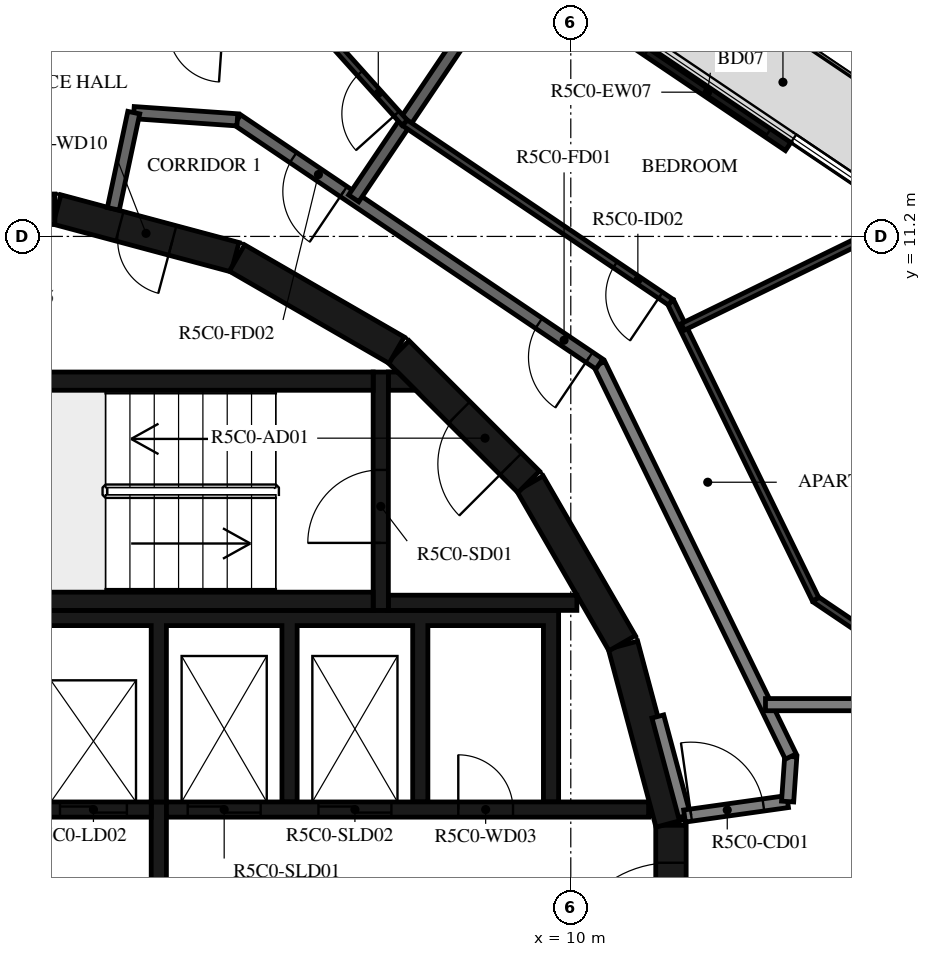
"""IFC4 building model, lengths in metres.
Left out: names, types, materials, properties, quantities, classifications, styles, units other than length and angle.
Written with IfcOpenShell. Run it as: python <this file> out.ifc"""

import sys

from ifc_helpers import new_model, si_unit, direction, frame, frame_2d, origin, place, context, subcontext, project, spatial, polyline, rectangle, outline, extrude, element, fill, save


model = new_model("IFC4")
c1 = context("Model", 3, precision=1e-05, world=origin(), true_north=direction((0.0, 1.0)))
c2 = subcontext(c1, "Body", "Model", "MODEL_VIEW")
j1 = project(units=[si_unit("LENGTHUNIT", "METRE"), si_unit("PLANEANGLEUNIT", "RADIAN")], contexts=[c1])
p1 = place(None, origin())
s1 = spatial("IfcSite", under=j1, at=p1, CompositionType="ELEMENT")
p2 = place(p1, origin())
s2 = spatial("IfcBuilding", under=s1, at=p2, CompositionType="ELEMENT")
p3 = place(p2, frame((0.0, 0.0, 216.4)))
s3 = spatial("IfcBuildingStorey", under=s2, at=p3, CompositionType="ELEMENT", Elevation=216.4)
p4 = place(p3, frame((13.574, 12.677, 0.0), z_axis=(0.0, 0.0, 1.0), x_axis=(-0.829068838882, 0.55914654644, 0.0)))
e1 = element("IfcWall", 1, at=p4, inside=s3, PredefinedType="STANDARD", context=c2, shape_type="SweptSolid", body=[
    extrude(rectangle(XDim=3.2, YDim=0.16, at=frame_2d((1.6, 0.0))), origin(), (0.0, 0.0, 1.0), 3.05),
])
p5 = place(p4, frame((0.4, 0.0, 0.0)))
e2 = element("IfcOpeningElement", 2, at=p5, cuts=e1, PredefinedType="OPENING", context=c2, shape_type="SweptSolid", body=[
    extrude(rectangle(XDim=2.4, YDim=2.4, at=frame_2d((1.2, 1.2))), frame((0.0, 0.09, 0.0), z_axis=(0.0, -1.0, 0.0), x_axis=(1.0, 0.0, 0.0)), (0.0, 0.0, 1.0), 0.18),
])
p6 = place(p3, frame((11.647, -1.516, 0.0), z_axis=(0.0, 0.0, 1.0), x_axis=(0.0, 1.0, 0.0)))
e3 = element("IfcWall", 3, at=p6, inside=s3, PredefinedType="SHEAR", context=c2, shape_type="SweptSolid", body=[
    extrude(rectangle(XDim=3.033, YDim=0.5, at=frame_2d((1.516, 0.0))), origin(), (0.0, 0.0, 1.0), 3.05),
])
p7 = place(p6, frame((0.616, 0.0, 0.0)))
e4 = element("IfcOpeningElement", 4, at=p7, cuts=e3, PredefinedType="OPENING", context=c2, shape_type="SweptSolid", body=[
    extrude(rectangle(XDim=1.8, YDim=2.1, at=frame_2d((0.9, 1.05))), frame((0.0, 0.26, 0.0), z_axis=(0.0, -1.0, 0.0), x_axis=(1.0, 0.0, 0.0)), (0.0, 0.0, 1.0), 0.52),
])
for number, where, z_axis, x_axis in (
    (5, (11.643, 1.55, 0.0), (0.0, 0.0, 1.0), (-0.259, 0.966, 0.0)),
    (6, (10.845, 4.51, 0.0), (0.0, 0.0, 1.0), (-0.5, 0.866, 0.0)),
):
    element("IfcWall", number, at=place(p3, frame(where, z_axis=z_axis, x_axis=x_axis)), inside=s3, PredefinedType="SHEAR", context=c2, shape_type="SweptSolid", body=[
        extrude(rectangle(XDim=3.033, YDim=0.5, at=frame_2d((1.516, 0.0))), origin(), (0.0, 0.0, 1.0), 3.05),
    ])
p8 = place(p3, frame((9.308, 7.164, 0.0), z_axis=(0.0, 0.0, 1.0), x_axis=(-0.707106781187, 0.707106781187, 0.0)))
e7 = element("IfcWall", 7, at=p8, inside=s3, PredefinedType="SHEAR", context=c2, shape_type="SweptSolid", body=[
    extrude(rectangle(XDim=3.032, YDim=0.5, at=frame_2d((1.516, 0.0))), origin(), (0.0, 0.0, 1.0), 3.05),
])
p9 = place(p8, frame((0.416, 0.0, 0.0)))
e8 = element("IfcOpeningElement", 8, at=p9, cuts=e7, PredefinedType="OPENING", context=c2, shape_type="SweptSolid", body=[
    extrude(rectangle(XDim=1.2, YDim=2.1, at=frame_2d((0.6, 1.05))), frame((0.0, 0.26, 0.0), z_axis=(0.0, -1.0, 0.0), x_axis=(1.0, 0.0, 0.0)), (0.0, 0.0, 1.0), 0.52),
])
p10 = place(p3, frame((7.137, 9.329, 0.0), z_axis=(0.0, 0.0, 1.0), x_axis=(-0.865975092491, 0.500087131594, 0.0)))
e9 = element("IfcWall", 9, at=p10, inside=s3, PredefinedType="SHEAR", context=c2, shape_type="SweptSolid", body=[
    extrude(rectangle(XDim=3.033, YDim=0.5, at=frame_2d((1.516, 0.0))), origin(), (0.0, 0.0, 1.0), 3.05),
])
p11 = place(p3, frame((4.479, 10.858, 0.0), z_axis=(0.0, 0.0, 1.0), x_axis=(-0.965948410781, 0.258734743916, 0.0)))
e10 = element("IfcWall", 10, at=p11, inside=s3, PredefinedType="SHEAR", context=c2, shape_type="SweptSolid", body=[
    extrude(rectangle(XDim=3.033, YDim=0.5, at=frame_2d((1.516, 0.0))), origin(), (0.0, 0.0, 1.0), 3.05),
])
p12 = place(p11, frame((1.066, 0.0, 0.0)))
e11 = element("IfcOpeningElement", 11, at=p12, cuts=e10, PredefinedType="OPENING", context=c2, shape_type="SweptSolid", body=[
    extrude(rectangle(XDim=0.9, YDim=2.1, at=frame_2d((0.45, 1.05))), frame((0.0, 0.26, 0.0), z_axis=(0.0, -1.0, 0.0), x_axis=(1.0, 0.0, 0.0)), (0.0, 0.0, 1.0), 0.52),
])
p13 = place(p3, frame((1.516, 11.647, 0.0), z_axis=(0.0, 0.0, 1.0), x_axis=(-1.0, 0.0, 0.0)))
e12 = element("IfcWall", 12, at=p13, inside=s3, PredefinedType="SHEAR", context=c2, shape_type="SweptSolid", body=[
    extrude(rectangle(XDim=3.033, YDim=0.5, at=frame_2d((1.516, 0.0))), origin(), (0.0, 0.0, 1.0), 3.05),
])
for number, where, z_axis, x_axis in (
    (13, (0.0, 5.2, 0.0), (0.0, 0.0, 1.0), (1.0, 0.0, 0.0)),
    (14, (0.0, 8.82, 0.0), (0.0, 0.0, 1.0), (1.0, 0.0, 0.0)),
):
    element("IfcWall", number, at=place(p3, frame(where, z_axis=z_axis, x_axis=x_axis)), inside=s3, PredefinedType="SHEAR", context=c2, shape_type="SweptSolid", body=[
        extrude(rectangle(XDim=6.75, YDim=0.3, at=frame_2d((3.375, 0.0))), origin(), (0.0, 0.0, 1.0), 3.05),
    ])
p14 = place(p3, frame((6.875, 5.05, 0.0), z_axis=(0.0, 0.0, 1.0), x_axis=(0.0, 1.0, 0.0)))
e15 = element("IfcWall", 15, at=p14, inside=s3, PredefinedType="SHEAR", context=c2, shape_type="SweptSolid", body=[
    extrude(rectangle(XDim=3.92, YDim=0.25, at=frame_2d((1.96, 0.0))), origin(), (0.0, 0.0, 1.0), 3.05),
])
p15 = place(p14, frame((1.11, 0.0, 0.0)))
e16 = element("IfcOpeningElement", 16, at=p15, cuts=e15, PredefinedType="OPENING", context=c2, shape_type="SweptSolid", body=[
    extrude(rectangle(XDim=1.2, YDim=2.1, at=frame_2d((0.6, 1.05))), frame((0.0, 0.135, 0.0), z_axis=(0.0, -1.0, 0.0), x_axis=(1.0, 0.0, 0.0)), (0.0, 0.0, 1.0), 0.27),
])
p16 = place(p3, frame((7.0, 5.175, 0.0), z_axis=(0.0, 0.0, 1.0), x_axis=(1.0, 0.0, 0.0)))
e17 = element("IfcWall", 17, at=p16, inside=s3, PredefinedType="SHEAR", context=c2, shape_type="SweptSolid", body=[
    extrude(rectangle(XDim=3.1, YDim=0.25, at=frame_2d((1.55, 0.0))), origin(), (0.0, 0.0, 1.0), 3.05),
])
p17 = place(p3, origin())
e18 = element("IfcWall", 18, at=p17, inside=s3, PredefinedType="SHEAR", context=c2, shape_type="SweptSolid", body=[
    extrude(outline(polyline([(7.448, 8.67), (7.0, 8.67), (7.0, 8.97), (7.148, 8.97), (7.448, 8.67)])), origin(), (0.0, 0.0, 1.0), 3.05),
])
p18 = place(p3, origin())
e19 = element("IfcWall", 19, at=p18, inside=s3, PredefinedType="SHEAR", context=c2, shape_type="SweptSolid", body=[
    extrude(outline(polyline([(-9.55, 4.8), (-5.5, 4.8), (-5.5, 1.9), (-5.25, 1.9), (-5.25, 4.8), (-1.2, 4.8), (-1.2, 1.9), (-0.95, 1.9), (-0.95, 4.8), (0.95, 4.8), (0.95, 1.9), (1.2, 1.9), (1.2, 4.8), (3.1, 4.8), (3.1, 1.9), (3.35, 1.9), (3.35, 4.8), (5.25, 4.8), (5.25, 1.9), (5.5, 1.9), (5.5, 4.8), (7.4, 4.8), (7.4, 1.9), (7.65, 1.9), (7.65, 4.8), (9.55, 4.8), (9.55, 1.9), (9.8, 1.9), (9.8, 4.8), (9.8, 5.05), (-9.8, 5.05), (-9.8, 4.8), (-9.8, 1.9), (-9.55, 1.9), (-9.55, 4.8)])), origin(), (0.0, 0.0, 1.0), 3.05),
])
p19 = place(p3, frame((-11.28, 1.775, 0.0), z_axis=(0.0, 0.0, 1.0), x_axis=(1.0, 0.0, 0.0)))
e20 = element("IfcWall", 20, at=p19, inside=s3, PredefinedType="SHEAR", context=c2, shape_type="SweptSolid", body=[
    extrude(rectangle(XDim=14.38, YDim=0.25, at=frame_2d((7.19, 0.0))), origin(), (0.0, 0.0, 1.0), 3.05),
])
p20 = place(p19, frame((10.73, 0.0, 0.0)))
e21 = element("IfcOpeningElement", 21, at=p20, cuts=e20, PredefinedType="OPENING", context=c2, shape_type="SweptSolid", body=[
    extrude(rectangle(XDim=1.1, YDim=2.1, at=frame_2d((0.55, 1.05))), frame((0.0, 0.135, 0.0), z_axis=(0.0, -1.0, 0.0), x_axis=(1.0, 0.0, 0.0)), (0.0, 0.0, 1.0), 0.27),
])
p21 = place(p19, frame((12.88, 0.0, 0.0)))
e22 = element("IfcOpeningElement", 22, at=p21, cuts=e20, PredefinedType="OPENING", context=c2, shape_type="SweptSolid", body=[
    extrude(rectangle(XDim=1.1, YDim=2.1, at=frame_2d((0.55, 1.05))), frame((0.0, 0.135, 0.0), z_axis=(0.0, -1.0, 0.0), x_axis=(1.0, 0.0, 0.0)), (0.0, 0.0, 1.0), 0.27),
])
p22 = place(p19, frame((3.305, 0.0, 0.0)))
e23 = element("IfcOpeningElement", 23, at=p22, cuts=e20, PredefinedType="OPENING", context=c2, shape_type="SweptSolid", body=[
    extrude(rectangle(XDim=0.9, YDim=2.1, at=frame_2d((0.45, 1.05))), frame((0.0, 0.135, 0.0), z_axis=(0.0, -1.0, 0.0), x_axis=(1.0, 0.0, 0.0)), (0.0, 0.0, 1.0), 0.27),
])
p23 = place(p19, frame((7.605, 0.0, 0.0)))
e24 = element("IfcOpeningElement", 24, at=p23, cuts=e20, PredefinedType="OPENING", context=c2, shape_type="SweptSolid", body=[
    extrude(rectangle(XDim=0.9, YDim=2.1, at=frame_2d((0.45, 1.05))), frame((0.0, 0.135, 0.0), z_axis=(0.0, -1.0, 0.0), x_axis=(1.0, 0.0, 0.0)), (0.0, 0.0, 1.0), 0.27),
])
p24 = place(p3, frame((3.35, 1.775, 0.0), z_axis=(0.0, 0.0, 1.0), x_axis=(1.0, 0.0, 0.0)))
e25 = element("IfcWall", 25, at=p24, inside=s3, PredefinedType="SHEAR", context=c2, shape_type="SweptSolid", body=[
    extrude(rectangle(XDim=7.93, YDim=0.25, at=frame_2d((3.965, 0.0))), origin(), (0.0, 0.0, 1.0), 3.05),
])
p25 = place(p24, frame((0.35, 0.0, 0.0)))
e26 = element("IfcOpeningElement", 26, at=p25, cuts=e25, PredefinedType="OPENING", context=c2, shape_type="SweptSolid", body=[
    extrude(rectangle(XDim=1.2, YDim=2.4, at=frame_2d((0.6, 1.2))), frame((0.0, 0.135, 0.0), z_axis=(0.0, -1.0, 0.0), x_axis=(1.0, 0.0, 0.0)), (0.0, 0.0, 1.0), 0.27),
])
p26 = place(p24, frame((2.5, 0.0, 0.0)))
e27 = element("IfcOpeningElement", 27, at=p26, cuts=e25, PredefinedType="OPENING", context=c2, shape_type="SweptSolid", body=[
    extrude(rectangle(XDim=1.2, YDim=2.4, at=frame_2d((0.6, 1.2))), frame((0.0, 0.135, 0.0), z_axis=(0.0, -1.0, 0.0), x_axis=(1.0, 0.0, 0.0)), (0.0, 0.0, 1.0), 0.27),
])
p27 = place(p24, frame((4.8, 0.0, 0.0)))
e28 = element("IfcOpeningElement", 28, at=p27, cuts=e25, PredefinedType="OPENING", context=c2, shape_type="SweptSolid", body=[
    extrude(rectangle(XDim=0.9, YDim=2.1, at=frame_2d((0.45, 1.05))), frame((0.0, 0.135, 0.0), z_axis=(0.0, -1.0, 0.0), x_axis=(1.0, 0.0, 0.0)), (0.0, 0.0, 1.0), 0.27),
])
p28 = place(p3, frame((3.225, -1.9, 0.0), z_axis=(0.0, 0.0, 1.0), x_axis=(0.0, 1.0, 0.0)))
e29 = element("IfcWall", 29, at=p28, inside=s3, PredefinedType="SHEAR", context=c2, shape_type="SweptSolid", body=[
    extrude(rectangle(XDim=3.8, YDim=0.25, at=frame_2d((1.9, 0.0))), origin(), (0.0, 0.0, 1.0), 3.05),
])
p29 = place(p3, frame((11.87, 1.668, 0.0), z_axis=(0.0, 0.0, 1.0), x_axis=(-0.258836880648, 0.965921047093, 0.0)))
e30 = element("IfcWall", 30, at=p29, inside=s3, PredefinedType="STANDARD", context=c2, shape_type="SweptSolid", body=[
    extrude(rectangle(XDim=1.695, YDim=0.2, at=frame_2d((0.848, 0.0))), origin(), (0.0, 0.0, 1.0), 3.05),
])
p30 = place(p3, frame((11.87, 1.668, 0.0), z_axis=(0.0, 0.0, 1.0), x_axis=(0.990271931984, 0.139145609792, 0.0)))
e31 = element("IfcWall", 31, at=p30, inside=s3, PredefinedType="STANDARD", context=c2, shape_type="SweptSolid", body=[
    extrude(rectangle(XDim=1.712, YDim=0.2, at=frame_2d((0.856, 0.0))), origin(), (0.0, 0.0, 1.0), 3.05),
])
p31 = place(p30, frame((0.11, 0.0, 0.0)))
e32 = element("IfcOpeningElement", 32, at=p31, cuts=e31, PredefinedType="OPENING", context=c2, shape_type="SweptSolid", body=[
    extrude(rectangle(XDim=1.2, YDim=2.1, at=frame_2d((0.6, 1.05))), frame((0.0, 0.11, 0.0), z_axis=(0.0, -1.0, 0.0), x_axis=(1.0, 0.0, 0.0)), (0.0, 0.0, 1.0), 0.22),
])
p32 = place(p3, frame((13.566, 1.906, 0.0), z_axis=(0.0, 0.0, 1.0), x_axis=(0.07005495793, 0.997543133338, 0.0)))
e33 = element("IfcWall", 33, at=p32, inside=s3, PredefinedType="STANDARD", context=c2, shape_type="SweptSolid", body=[
    extrude(rectangle(XDim=0.742, YDim=0.2, at=frame_2d((0.371, 0.0))), origin(), (0.0, 0.0, 1.0), 3.05),
])
p33 = place(p3, frame((13.618, 2.647, 0.0), z_axis=(0.0, 0.0, 1.0), x_axis=(-0.438366026218, 0.898796543751, 0.0)))
e34 = element("IfcWall", 34, at=p33, inside=s3, PredefinedType="STANDARD", context=c2, shape_type="SweptSolid", body=[
    extrude(rectangle(XDim=7.181, YDim=0.2, at=frame_2d((3.591, 0.0))), origin(), (0.0, 0.0, 1.0), 3.05),
])
p34 = place(p3, frame((10.47, 9.101, 0.0), z_axis=(0.0, 0.0, 1.0), x_axis=(-0.829035841718, 0.559195469534, 0.0)))
e35 = element("IfcWall", 35, at=p34, inside=s3, PredefinedType="STANDARD", context=c2, shape_type="SweptSolid", body=[
    extrude(rectangle(XDim=7.181, YDim=0.2, at=frame_2d((3.591, 0.0))), origin(), (0.0, 0.0, 1.0), 3.05),
])
p35 = place(p34, frame((0.2, 0.0, 0.0)))
e36 = element("IfcOpeningElement", 36, at=p35, cuts=e35, PredefinedType="OPENING", context=c2, shape_type="SweptSolid", body=[
    extrude(rectangle(XDim=1.0, YDim=2.1, at=frame_2d((0.5, 1.05))), frame((0.0, 0.11, 0.0), z_axis=(0.0, -1.0, 0.0), x_axis=(1.0, 0.0, 0.0)), (0.0, 0.0, 1.0), 0.22),
])
p36 = place(p34, frame((5.073, 0.0, 0.0)))
e37 = element("IfcOpeningElement", 37, at=p36, cuts=e35, PredefinedType="OPENING", context=c2, shape_type="SweptSolid", body=[
    extrude(rectangle(XDim=1.0, YDim=2.1, at=frame_2d((0.5, 1.05))), frame((0.0, 0.11, 0.0), z_axis=(0.0, -1.0, 0.0), x_axis=(1.0, 0.0, 0.0)), (0.0, 0.0, 1.0), 0.22),
])
p37 = place(p3, frame((4.517, 13.117, 0.0), z_axis=(0.0, 0.0, 1.0), x_axis=(-0.997562153664, 0.069783591025, 0.0)))
e38 = element("IfcWall", 38, at=p37, inside=s3, PredefinedType="STANDARD", context=c2, shape_type="SweptSolid", body=[
    extrude(rectangle(XDim=1.707, YDim=0.2, at=frame_2d((0.854, 0.0))), origin(), (0.0, 0.0, 1.0), 3.05),
])
p38 = place(p3, frame((2.813, 13.236, 0.0), z_axis=(0.0, 0.0, 1.0), x_axis=(-0.207911086063, -0.978147729278, 0.0)))
e39 = element("IfcWall", 39, at=p38, inside=s3, PredefinedType="STANDARD", context=c2, shape_type="SweptSolid", body=[
    extrude(rectangle(XDim=1.618, YDim=0.2, at=frame_2d((0.809, 0.0))), origin(), (0.0, 0.0, 1.0), 3.05),
])
p39 = place(p3, frame((17.9, 3.5, 0.0), z_axis=(0.0, 0.0, 1.0), x_axis=(-1.0, 0.0, 0.0)))
e40 = element("IfcWall", 40, at=p39, inside=s3, PredefinedType="STANDARD", context=c2, shape_type="SweptSolid", body=[
    extrude(rectangle(XDim=4.698, YDim=0.2, at=frame_2d((2.349, 0.0))), origin(), (0.0, 0.0, 1.0), 3.05),
])
p40 = place(p3, frame((9.104, 15.79, 0.0), z_axis=(0.0, 0.0, 1.0), x_axis=(-0.559193912135, -0.829036892201, 0.0)))
e41 = element("IfcWall", 41, at=p40, inside=s3, PredefinedType="STANDARD", context=c2, shape_type="SweptSolid", body=[
    extrude(rectangle(XDim=4.781, YDim=0.2, at=frame_2d((2.39, 0.0))), origin(), (0.0, 0.0, 1.0), 3.05),
])
p41 = place(p3, frame((14.654, 4.808, 0.0), z_axis=(0.0, 0.0, 1.0), x_axis=(-0.829065184024, 0.559151965604, 0.0)))
e42 = element("IfcWall", 42, at=p41, inside=s3, PredefinedType="PARTITIONING", context=c2, shape_type="SweptSolid", body=[
    extrude(rectangle(XDim=0.758, YDim=0.12, at=frame_2d((0.379, 0.0))), origin(), (0.0, 0.0, 1.0), 3.05),
])
p42 = place(p3, frame((14.026, 5.232, 0.0), z_axis=(0.0, 0.0, 1.0), x_axis=(-0.438374985284, 0.89879217413, 0.0)))
e43 = element("IfcWall", 43, at=p42, inside=s3, PredefinedType="PARTITIONING", context=c2, shape_type="SweptSolid", body=[
    extrude(rectangle(XDim=5.438, YDim=0.12, at=frame_2d((2.719, 0.0))), origin(), (0.0, 0.0, 1.0), 3.05),
])
p43 = place(p3, frame((11.642, 10.12, 0.0), z_axis=(0.0, 0.0, 1.0), x_axis=(-0.829054664054, 0.559167563446, 0.0)))
e44 = element("IfcWall", 44, at=p43, inside=s3, PredefinedType="PARTITIONING", context=c2, shape_type="SweptSolid", body=[
    extrude(rectangle(XDim=5.275, YDim=0.12, at=frame_2d((2.637, 0.0))), origin(), (0.0, 0.0, 1.0), 3.05),
])
p44 = place(p43, frame((0.2, 0.0, 0.0)))
e45 = element("IfcOpeningElement", 45, at=p44, cuts=e44, PredefinedType="OPENING", context=c2, shape_type="SweptSolid", body=[
    extrude(rectangle(XDim=0.9, YDim=2.1, at=frame_2d((0.45, 1.05))), frame((0.0, 0.07, 0.0), z_axis=(0.0, -1.0, 0.0), x_axis=(1.0, 0.0, 0.0)), (0.0, 0.0, 1.0), 0.14),
])
p45 = place(p3, frame((15.482, 11.487, 0.0), z_axis=(0.0, 0.0, 1.0), x_axis=(-0.898807251285, -0.438344071521, 0.0)))
e46 = element("IfcWall", 46, at=p45, inside=s3, PredefinedType="PARTITIONING", context=c2, shape_type="SweptSolid", body=[
    extrude(rectangle(XDim=4.051, YDim=0.12, at=frame_2d((2.025, 0.0))), origin(), (0.0, 0.0, 1.0), 3.05),
])
p46 = place(p3, frame((7.269, 13.07, 0.0), z_axis=(0.0, 0.0, 1.0), x_axis=(-0.668495993587, 0.743715743116, 0.0)))
e47 = element("IfcWall", 47, at=p46, inside=s3, PredefinedType="PARTITIONING", context=c2, shape_type="SweptSolid", body=[
    extrude(rectangle(XDim=3.281, YDim=0.12, at=frame_2d((1.641, 0.0))), origin(), (0.0, 0.0, 1.0), 3.05),
])
p47 = place(p46, frame((0.2, 0.0, 0.0)))
e48 = element("IfcOpeningElement", 48, at=p47, cuts=e47, PredefinedType="OPENING", context=c2, shape_type="SweptSolid", body=[
    extrude(rectangle(XDim=0.9, YDim=2.1, at=frame_2d((0.45, 1.05))), frame((0.0, 0.07, 0.0), z_axis=(0.0, -1.0, 0.0), x_axis=(1.0, 0.0, 0.0)), (0.0, 0.0, 1.0), 0.14),
])
p48 = place(p5, origin())
e49 = element("IfcDoor", 49, at=p48, inside=s3, OperationType="DOUBLE_DOOR_SLIDING", PredefinedType="DOOR", context=c2, shape_type="SweptSolid", body=[
    extrude(rectangle(XDim=2.4, YDim=2.4, at=frame_2d((1.2, 1.2))), frame((0.0, 0.025, 0.0), z_axis=(0.0, -1.0, 0.0), x_axis=(1.0, 0.0, 0.0)), (0.0, 0.0, 1.0), 0.05),
])
fill(e2, e49)
p49 = place(p15, origin())
e50 = element("IfcDoor", 50, at=p49, inside=s3, OperationType="SINGLE_SWING_LEFT", PredefinedType="DOOR", context=c2, shape_type="SweptSolid", body=[
    extrude(rectangle(XDim=1.2, YDim=2.1, at=frame_2d((0.6, 1.05))), frame((0.0, 0.025, 0.0), z_axis=(0.0, -1.0, 0.0), x_axis=(1.0, 0.0, 0.0)), (0.0, 0.0, 1.0), 0.05),
])
fill(e16, e50)
p50 = place(p9, origin())
e51 = element("IfcDoor", 51, at=p50, inside=s3, OperationType="SINGLE_SWING_RIGHT", PredefinedType="DOOR", context=c2, shape_type="SweptSolid", body=[
    extrude(rectangle(XDim=1.2, YDim=2.1, at=frame_2d((0.6, 1.05))), frame((0.0, 0.025, 0.0), z_axis=(0.0, -1.0, 0.0), x_axis=(1.0, 0.0, 0.0)), (0.0, 0.0, 1.0), 0.05),
])
fill(e8, e51)
p51 = place(p7, origin())
e52 = element("IfcDoor", 52, at=p51, inside=s3, OperationType="DOUBLE_DOOR_SINGLE_SWING", PredefinedType="DOOR", context=c2, shape_type="SweptSolid", body=[
    extrude(rectangle(XDim=1.8, YDim=2.1, at=frame_2d((0.9, 1.05))), frame((0.0, 0.025, 0.0), z_axis=(0.0, -1.0, 0.0), x_axis=(1.0, 0.0, 0.0)), (0.0, 0.0, 1.0), 0.05),
])
fill(e4, e52)
p52 = place(p21, origin())
e53 = element("IfcDoor", 53, at=p52, inside=s3, OperationType="DOUBLE_DOOR_SLIDING", PredefinedType="DOOR", context=c2, shape_type="SweptSolid", body=[
    extrude(rectangle(XDim=1.1, YDim=2.1, at=frame_2d((0.55, 1.05))), frame((0.0, 0.025, 0.0), z_axis=(0.0, -1.0, 0.0), x_axis=(1.0, 0.0, 0.0)), (0.0, 0.0, 1.0), 0.05),
])
fill(e22, e53)
p53 = place(p25, origin())
e54 = element("IfcDoor", 54, at=p53, inside=s3, OperationType="DOUBLE_DOOR_SLIDING", PredefinedType="DOOR", context=c2, shape_type="SweptSolid", body=[
    extrude(rectangle(XDim=1.2, YDim=2.4, at=frame_2d((0.6, 1.2))), frame((0.0, 0.025, 0.0), z_axis=(0.0, -1.0, 0.0), x_axis=(1.0, 0.0, 0.0)), (0.0, 0.0, 1.0), 0.05),
])
fill(e26, e54)
p54 = place(p26, origin())
e55 = element("IfcDoor", 55, at=p54, inside=s3, OperationType="DOUBLE_DOOR_SLIDING", PredefinedType="DOOR", context=c2, shape_type="SweptSolid", body=[
    extrude(rectangle(XDim=1.2, YDim=2.4, at=frame_2d((0.6, 1.2))), frame((0.0, 0.025, 0.0), z_axis=(0.0, -1.0, 0.0), x_axis=(1.0, 0.0, 0.0)), (0.0, 0.0, 1.0), 0.05),
])
fill(e27, e55)
p55 = place(p27, origin())
e56 = element("IfcDoor", 56, at=p55, inside=s3, OperationType="SINGLE_SWING_LEFT", PredefinedType="DOOR", context=c2, shape_type="SweptSolid", body=[
    extrude(rectangle(XDim=0.9, YDim=2.1, at=frame_2d((0.45, 1.05))), frame((0.0, 0.025, 0.0), z_axis=(0.0, -1.0, 0.0), x_axis=(1.0, 0.0, 0.0)), (0.0, 0.0, 1.0), 0.05),
])
fill(e28, e56)
p56 = place(p12, origin())
e57 = element("IfcDoor", 57, at=p56, inside=s3, OperationType="SINGLE_SWING_RIGHT", PredefinedType="DOOR", context=c2, shape_type="SweptSolid", body=[
    extrude(rectangle(XDim=0.9, YDim=2.1, at=frame_2d((0.45, 1.05))), frame((0.0, 0.025, 0.0), z_axis=(0.0, -1.0, 0.0), x_axis=(1.0, 0.0, 0.0)), (0.0, 0.0, 1.0), 0.05),
])
fill(e11, e57)
p57 = place(p35, origin())
e58 = element("IfcDoor", 58, at=p57, inside=s3, OperationType="SINGLE_SWING_LEFT", PredefinedType="DOOR", context=c2, shape_type="SweptSolid", body=[
    extrude(rectangle(XDim=1.0, YDim=2.1, at=frame_2d((0.5, 1.05))), frame((0.0, 0.025, 0.0), z_axis=(0.0, -1.0, 0.0), x_axis=(1.0, 0.0, 0.0)), (0.0, 0.0, 1.0), 0.05),
])
fill(e36, e58)
p58 = place(p44, origin())
e59 = element("IfcDoor", 59, at=p58, inside=s3, OperationType="SINGLE_SWING_LEFT", PredefinedType="DOOR", context=c2, shape_type="SweptSolid", body=[
    extrude(rectangle(XDim=0.9, YDim=2.1, at=frame_2d((0.45, 1.05))), frame((0.0, 0.025, 0.0), z_axis=(0.0, -1.0, 0.0), x_axis=(1.0, 0.0, 0.0)), (0.0, 0.0, 1.0), 0.05),
])
fill(e45, e59)
p59 = place(p36, origin())
e60 = element("IfcDoor", 60, at=p59, inside=s3, OperationType="SINGLE_SWING_RIGHT", PredefinedType="DOOR", context=c2, shape_type="SweptSolid", body=[
    extrude(rectangle(XDim=1.0, YDim=2.1, at=frame_2d((0.5, 1.05))), frame((0.0, 0.025, 0.0), z_axis=(0.0, -1.0, 0.0), x_axis=(1.0, 0.0, 0.0)), (0.0, 0.0, 1.0), 0.05),
])
fill(e37, e60)
p60 = place(p47, origin())
e61 = element("IfcDoor", 61, at=p60, inside=s3, OperationType="SINGLE_SWING_RIGHT", PredefinedType="DOOR", context=c2, shape_type="SweptSolid", body=[
    extrude(rectangle(XDim=0.9, YDim=2.1, at=frame_2d((0.45, 1.05))), frame((0.0, 0.025, 0.0), z_axis=(0.0, -1.0, 0.0), x_axis=(1.0, 0.0, 0.0)), (0.0, 0.0, 1.0), 0.05),
])
fill(e48, e61)
p61 = place(p31, origin())
e62 = element("IfcDoor", 62, at=p61, inside=s3, OperationType="DOUBLE_DOOR_SINGLE_SWING", PredefinedType="DOOR", context=c2, shape_type="SweptSolid", body=[
    extrude(rectangle(XDim=1.2, YDim=2.1, at=frame_2d((0.6, 1.05))), frame((0.0, 0.025, 0.0), z_axis=(0.0, -1.0, 0.0), x_axis=(1.0, 0.0, 0.0)), (0.0, 0.0, 1.0), 0.05),
])
fill(e32, e62)
save(model, sys.argv[1])
